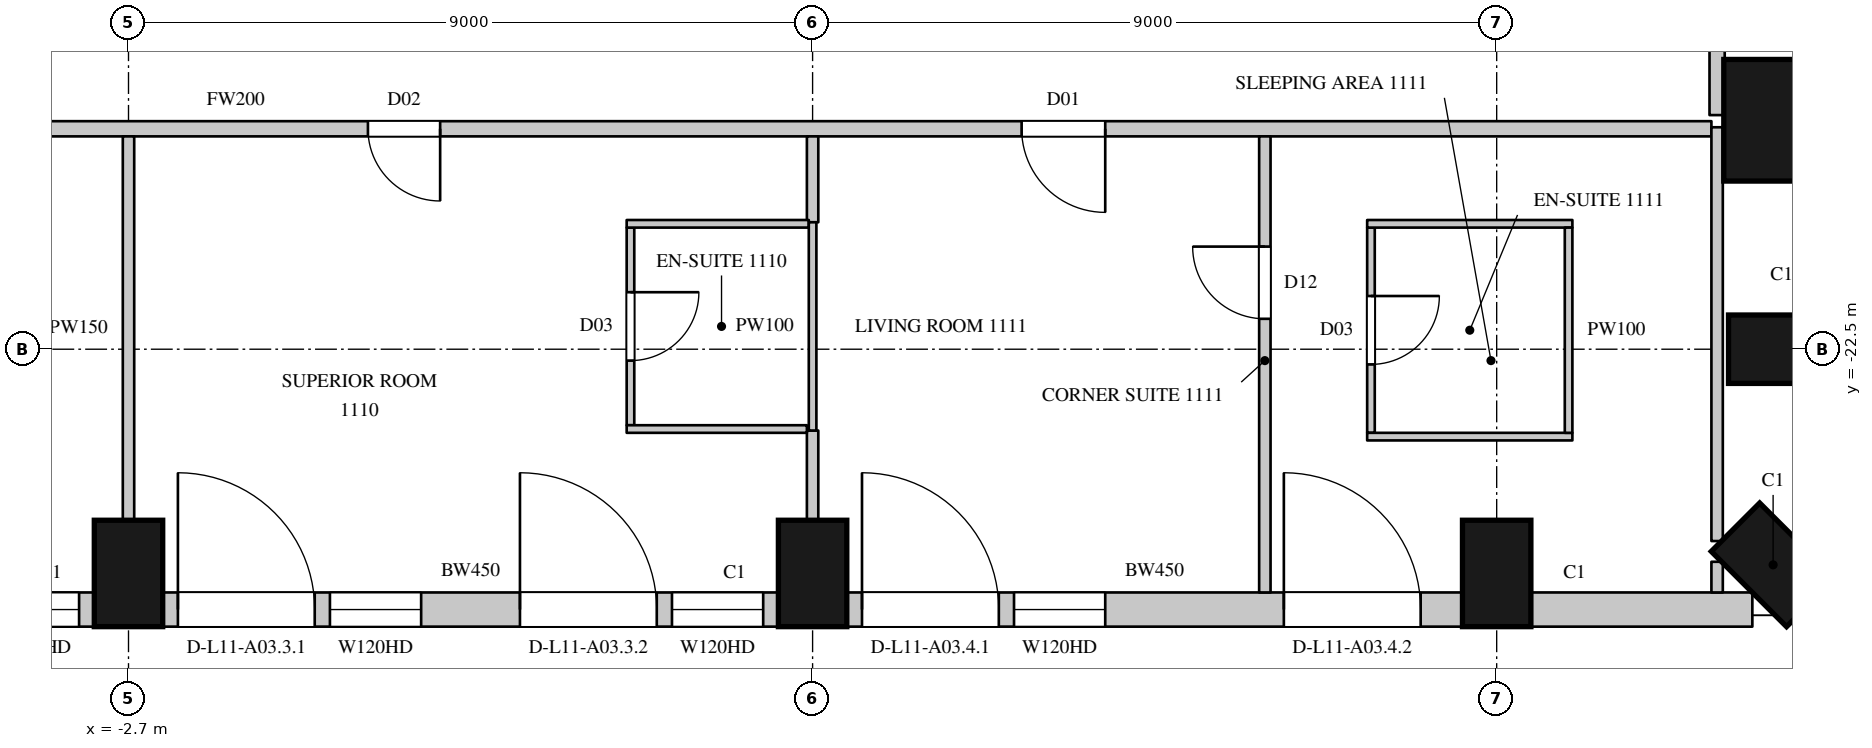
"""IFC4 building model, lengths in metres.
Left out: names, types, materials, properties, quantities, classifications, styles, units other than length and angle.
Written with IfcOpenShell. Run it as: python <this file> out.ifc"""

import sys

from ifc_helpers import new_model, si_unit, direction, frame, frame_2d, origin, origin_2d, place, context, subcontext, project, spatial, rectangle, circle, extrude, element, fill, save


model = new_model("IFC4")
c1 = context("Model", 3, precision=1e-05, world=origin(), true_north=direction((0.0, 1.0)))
c2 = subcontext(c1, "Body", "Model", "MODEL_VIEW")
j1 = project(units=[si_unit("LENGTHUNIT", "METRE"), si_unit("PLANEANGLEUNIT", "RADIAN")], contexts=[c1])
p1 = place(None, origin())
s1 = spatial("IfcSite", under=j1, at=p1, CompositionType="ELEMENT")
p2 = place(p1, origin())
s2 = spatial("IfcBuilding", under=s1, at=p2, CompositionType="ELEMENT")
p3 = place(p2, frame((0.0, 0.0, 69.9)))
s3 = spatial("IfcBuildingStorey", under=s2, at=p3, CompositionType="ELEMENT", Elevation=69.9)
for number, where, z_axis, x_axis in (
    (1, (-2.7, -25.45, 0.0), (0.0, 0.0, 1.0), (1.0, 0.0, 0.0)),
    (2, (6.3, -25.45, 0.0), (0.0, 0.0, 1.0), (1.0, 0.0, 0.0)),
    (3, (15.3, -25.45, 0.0), (0.0, 0.0, 1.0), (1.0, 0.0, 0.0)),
    (4, (18.937, -25.337, 0.0), (0.0, 0.0, 1.0), (0.707, 0.707, 0.0)),
    (5, (19.05, -22.5, 0.0), (0.0, 0.0, 1.0), (0.0, 1.0, 0.0)),
):
    element("IfcColumn", number, at=place(p3, frame(where, z_axis=z_axis, x_axis=x_axis)), inside=s3, PredefinedType="COLUMN", context=c2, shape_type="SweptSolid", body=[
        extrude(rectangle(XDim=0.9, YDim=1.4, at=origin_2d()), origin(), (0.0, 0.0, 1.0), 3.6),
    ])
p4 = place(p3, frame((19.088, -19.488, 0.0), z_axis=(0.0, 0.0, 1.0), x_axis=(1.0, 0.0, 0.0)))
e6 = element("IfcColumn", 6, at=p4, inside=s3, PredefinedType="COLUMN", context=c2, shape_type="SweptSolid", body=[
    extrude(circle(Radius=0.8, at=origin_2d()), origin(), (0.0, 0.0, 1.0), 3.6),
])
p5 = place(p3, frame((-11.25, -25.925, 0.0), z_axis=(0.0, 0.0, 1.0), x_axis=(1.0, 0.0, 0.0)))
e7 = element("IfcWall", 7, at=p5, inside=s3, PredefinedType="SOLIDWALL", context=c2, shape_type="SweptSolid", body=[
    extrude(rectangle(XDim=8.1, YDim=0.45, at=frame_2d((4.05, 0.0))), origin(), (0.0, 0.0, 1.0), 3.3),
])
p6 = place(p5, frame((0.2, 0.0, 0.0)))
e8 = element("IfcOpeningElement", 8, at=p6, cuts=e7, PredefinedType="OPENING", context=c2, shape_type="SweptSolid", body=[
    extrude(rectangle(XDim=1.8, YDim=2.4, at=frame_2d((0.9, 1.2))), frame((0.0, 0.235, 0.0), z_axis=(0.0, -1.0, 0.0), x_axis=(1.0, 0.0, 0.0)), (0.0, 0.0, 1.0), 0.47),
])
p7 = place(p5, frame((2.2, 0.0, 1.05)))
e9 = element("IfcOpeningElement", 9, at=p7, cuts=e7, PredefinedType="OPENING", context=c2, shape_type="SweptSolid", body=[
    extrude(rectangle(XDim=1.2, YDim=2.0, at=frame_2d((0.6, 1.0))), frame((0.0, 0.235, 0.0), z_axis=(0.0, -1.0, 0.0), x_axis=(1.0, 0.0, 0.0)), (0.0, 0.0, 1.0), 0.47),
])
p8 = place(p5, frame((4.7, 0.0, 0.0)))
e10 = element("IfcOpeningElement", 10, at=p8, cuts=e7, PredefinedType="OPENING", context=c2, shape_type="SweptSolid", body=[
    extrude(rectangle(XDim=1.8, YDim=2.4, at=frame_2d((0.9, 1.2))), frame((0.0, 0.235, 0.0), z_axis=(0.0, -1.0, 0.0), x_axis=(1.0, 0.0, 0.0)), (0.0, 0.0, 1.0), 0.47),
])
p9 = place(p5, frame((6.7, 0.0, 1.05)))
e11 = element("IfcOpeningElement", 11, at=p9, cuts=e7, PredefinedType="OPENING", context=c2, shape_type="SweptSolid", body=[
    extrude(rectangle(XDim=1.2, YDim=2.0, at=frame_2d((0.6, 1.0))), frame((0.0, 0.235, 0.0), z_axis=(0.0, -1.0, 0.0), x_axis=(1.0, 0.0, 0.0)), (0.0, 0.0, 1.0), 0.47),
])
p10 = place(p3, frame((-2.25, -25.925, 0.0), z_axis=(0.0, 0.0, 1.0), x_axis=(1.0, 0.0, 0.0)))
e12 = element("IfcWall", 12, at=p10, inside=s3, PredefinedType="SOLIDWALL", context=c2, shape_type="SweptSolid", body=[
    extrude(rectangle(XDim=8.1, YDim=0.45, at=frame_2d((4.05, 0.0))), origin(), (0.0, 0.0, 1.0), 3.3),
])
p11 = place(p10, frame((0.2, 0.0, 0.0)))
e13 = element("IfcOpeningElement", 13, at=p11, cuts=e12, PredefinedType="OPENING", context=c2, shape_type="SweptSolid", body=[
    extrude(rectangle(XDim=1.8, YDim=2.4, at=frame_2d((0.9, 1.2))), frame((0.0, 0.235, 0.0), z_axis=(0.0, -1.0, 0.0), x_axis=(1.0, 0.0, 0.0)), (0.0, 0.0, 1.0), 0.47),
])
p12 = place(p10, frame((2.2, 0.0, 1.05)))
e14 = element("IfcOpeningElement", 14, at=p12, cuts=e12, PredefinedType="OPENING", context=c2, shape_type="SweptSolid", body=[
    extrude(rectangle(XDim=1.2, YDim=2.0, at=frame_2d((0.6, 1.0))), frame((0.0, 0.235, 0.0), z_axis=(0.0, -1.0, 0.0), x_axis=(1.0, 0.0, 0.0)), (0.0, 0.0, 1.0), 0.47),
])
p13 = place(p10, frame((4.7, 0.0, 0.0)))
e15 = element("IfcOpeningElement", 15, at=p13, cuts=e12, PredefinedType="OPENING", context=c2, shape_type="SweptSolid", body=[
    extrude(rectangle(XDim=1.8, YDim=2.4, at=frame_2d((0.9, 1.2))), frame((0.0, 0.235, 0.0), z_axis=(0.0, -1.0, 0.0), x_axis=(1.0, 0.0, 0.0)), (0.0, 0.0, 1.0), 0.47),
])
p14 = place(p10, frame((6.7, 0.0, 1.05)))
e16 = element("IfcOpeningElement", 16, at=p14, cuts=e12, PredefinedType="OPENING", context=c2, shape_type="SweptSolid", body=[
    extrude(rectangle(XDim=1.2, YDim=2.0, at=frame_2d((0.6, 1.0))), frame((0.0, 0.235, 0.0), z_axis=(0.0, -1.0, 0.0), x_axis=(1.0, 0.0, 0.0)), (0.0, 0.0, 1.0), 0.47),
])
p15 = place(p3, frame((6.75, -25.925, 0.0), z_axis=(0.0, 0.0, 1.0), x_axis=(1.0, 0.0, 0.0)))
e17 = element("IfcWall", 17, at=p15, inside=s3, PredefinedType="SOLIDWALL", context=c2, shape_type="SweptSolid", body=[
    extrude(rectangle(XDim=8.1, YDim=0.45, at=frame_2d((4.05, 0.0))), origin(), (0.0, 0.0, 1.0), 3.3),
])
p16 = place(p15, frame((0.2, 0.0, 0.0)))
e18 = element("IfcOpeningElement", 18, at=p16, cuts=e17, PredefinedType="OPENING", context=c2, shape_type="SweptSolid", body=[
    extrude(rectangle(XDim=1.8, YDim=2.4, at=frame_2d((0.9, 1.2))), frame((0.0, 0.235, 0.0), z_axis=(0.0, -1.0, 0.0), x_axis=(1.0, 0.0, 0.0)), (0.0, 0.0, 1.0), 0.47),
])
p17 = place(p15, frame((2.2, 0.0, 1.05)))
e19 = element("IfcOpeningElement", 19, at=p17, cuts=e17, PredefinedType="OPENING", context=c2, shape_type="SweptSolid", body=[
    extrude(rectangle(XDim=1.2, YDim=2.0, at=frame_2d((0.6, 1.0))), frame((0.0, 0.235, 0.0), z_axis=(0.0, -1.0, 0.0), x_axis=(1.0, 0.0, 0.0)), (0.0, 0.0, 1.0), 0.47),
])
p18 = place(p15, frame((5.75, 0.0, 0.0)))
e20 = element("IfcOpeningElement", 20, at=p18, cuts=e17, PredefinedType="OPENING", context=c2, shape_type="SweptSolid", body=[
    extrude(rectangle(XDim=1.8, YDim=2.4, at=frame_2d((0.9, 1.2))), frame((0.0, 0.235, 0.0), z_axis=(0.0, -1.0, 0.0), x_axis=(1.0, 0.0, 0.0)), (0.0, 0.0, 1.0), 0.47),
])
p19 = place(p3, frame((15.75, -25.925, 0.0), z_axis=(0.0, 0.0, 1.0), x_axis=(1.0, 0.0, 0.0)))
e21 = element("IfcWall", 21, at=p19, inside=s3, PredefinedType="SOLIDWALL", context=c2, shape_type="SweptSolid", body=[
    extrude(rectangle(XDim=2.914, YDim=0.45, at=frame_2d((1.457, 0.0))), origin(), (0.0, 0.0, 1.0), 3.3),
])
p20 = place(p3, frame((-20.7, -19.6, 0.0), z_axis=(0.0, 0.0, 1.0), x_axis=(1.0, 0.0, 0.0)))
e22 = element("IfcWall", 22, at=p20, inside=s3, PredefinedType="PARTITIONING", context=c2, shape_type="SweptSolid", body=[
    extrude(rectangle(XDim=38.825, YDim=0.2, at=frame_2d((19.413, 0.0))), origin(), (0.0, 0.0, 1.0), 3.3),
])
p21 = place(p20, frame((3.15, 0.0, 0.0)))
e23 = element("IfcOpeningElement", 23, at=p21, cuts=e22, PredefinedType="OPENING", context=c2, shape_type="SweptSolid", body=[
    extrude(rectangle(XDim=0.95, YDim=2.2, at=frame_2d((0.475, 1.1))), frame((0.0, 0.11, 0.0), z_axis=(0.0, -1.0, 0.0), x_axis=(1.0, 0.0, 0.0)), (0.0, 0.0, 1.0), 0.22),
])
p22 = place(p20, frame((13.9, 0.0, 0.0)))
e24 = element("IfcOpeningElement", 24, at=p22, cuts=e22, PredefinedType="OPENING", context=c2, shape_type="SweptSolid", body=[
    extrude(rectangle(XDim=0.95, YDim=2.2, at=frame_2d((0.475, 1.1))), frame((0.0, 0.11, 0.0), z_axis=(0.0, -1.0, 0.0), x_axis=(1.0, 0.0, 0.0)), (0.0, 0.0, 1.0), 0.22),
])
p23 = place(p20, frame((21.15, 0.0, 0.0)))
e25 = element("IfcOpeningElement", 25, at=p23, cuts=e22, PredefinedType="OPENING", context=c2, shape_type="SweptSolid", body=[
    extrude(rectangle(XDim=0.95, YDim=2.2, at=frame_2d((0.475, 1.1))), frame((0.0, 0.11, 0.0), z_axis=(0.0, -1.0, 0.0), x_axis=(1.0, 0.0, 0.0)), (0.0, 0.0, 1.0), 0.22),
])
p24 = place(p20, frame((29.75, 0.0, 0.0)))
e26 = element("IfcOpeningElement", 26, at=p24, cuts=e22, PredefinedType="OPENING", context=c2, shape_type="SweptSolid", body=[
    extrude(rectangle(XDim=1.1, YDim=2.4, at=frame_2d((0.55, 1.2))), frame((0.0, 0.11, 0.0), z_axis=(0.0, -1.0, 0.0), x_axis=(1.0, 0.0, 0.0)), (0.0, 0.0, 1.0), 0.22),
])
p25 = place(p3, frame((18.2, -19.42, 0.0), z_axis=(0.0, 0.0, 1.0), x_axis=(0.0, 1.0, 0.0)))
e27 = element("IfcWall", 27, at=p25, inside=s3, PredefinedType="PARTITIONING", context=c2, shape_type="SweptSolid", body=[
    extrude(rectangle(XDim=14.67, YDim=0.2, at=frame_2d((7.335, 0.0))), origin(), (0.0, 0.0, 1.0), 3.3),
])
p26 = place(p25, frame((3.95, 0.0, 0.0)))
e28 = element("IfcOpeningElement", 28, at=p26, cuts=e27, PredefinedType="OPENING", context=c2, shape_type="SweptSolid", body=[
    extrude(rectangle(XDim=0.95, YDim=2.2, at=frame_2d((0.475, 1.1))), frame((0.0, 0.11, 0.0), z_axis=(0.0, -1.0, 0.0), x_axis=(1.0, 0.0, 0.0)), (0.0, 0.0, 1.0), 0.22),
])
p27 = place(p25, frame((13.35, 0.0, 0.0)))
e29 = element("IfcOpeningElement", 29, at=p27, cuts=e27, PredefinedType="OPENING", context=c2, shape_type="SweptSolid", body=[
    extrude(rectangle(XDim=0.95, YDim=2.2, at=frame_2d((0.475, 1.1))), frame((0.0, 0.11, 0.0), z_axis=(0.0, -1.0, 0.0), x_axis=(1.0, 0.0, 0.0)), (0.0, 0.0, 1.0), 0.22),
])
p28 = place(p3, frame((-2.7, -24.75, 0.0), z_axis=(0.0, 0.0, 1.0), x_axis=(0.0, 1.0, 0.0)))
e30 = element("IfcWall", 30, at=p28, inside=s3, PredefinedType="PARTITIONING", context=c2, shape_type="SweptSolid", body=[
    extrude(rectangle(XDim=5.05, YDim=0.15, at=frame_2d((2.525, 0.0))), origin(), (0.0, 0.0, 1.0), 2.75),
])
p29 = place(p3, frame((6.3, -24.75, 0.0), z_axis=(0.0, 0.0, 1.0), x_axis=(0.0, 1.0, 0.0)))
e31 = element("IfcWall", 31, at=p29, inside=s3, PredefinedType="PARTITIONING", context=c2, shape_type="SweptSolid", body=[
    extrude(rectangle(XDim=1.18, YDim=0.15, at=frame_2d((0.59, 0.0))), origin(), (0.0, 0.0, 1.0), 2.75),
])
p30 = place(p3, frame((6.3, -20.83, 0.0), z_axis=(0.0, 0.0, 1.0), x_axis=(0.0, 1.0, 0.0)))
e32 = element("IfcWall", 32, at=p30, inside=s3, PredefinedType="PARTITIONING", context=c2, shape_type="SweptSolid", body=[
    extrude(rectangle(XDim=1.13, YDim=0.15, at=frame_2d((0.565, 0.0))), origin(), (0.0, 0.0, 1.0), 2.75),
])
p31 = place(p3, frame((12.25, -25.7, 0.0), z_axis=(0.0, 0.0, 1.0), x_axis=(0.0, 1.0, 0.0)))
e33 = element("IfcWall", 33, at=p31, inside=s3, PredefinedType="PARTITIONING", context=c2, shape_type="SweptSolid", body=[
    extrude(rectangle(XDim=6.0, YDim=0.15, at=frame_2d((3.0, 0.0))), origin(), (0.0, 0.0, 1.0), 3.3),
])
p32 = place(p31, frame((3.6, 0.0, 0.0)))
e34 = element("IfcOpeningElement", 34, at=p32, cuts=e33, PredefinedType="OPENING", context=c2, shape_type="SweptSolid", body=[
    extrude(rectangle(XDim=0.95, YDim=2.2, at=frame_2d((0.475, 1.1))), frame((0.0, 0.085, 0.0), z_axis=(0.0, -1.0, 0.0), x_axis=(1.0, 0.0, 0.0)), (0.0, 0.0, 1.0), 0.17),
])
p33 = place(p3, frame((18.2, -25.7, 0.0), z_axis=(0.0, 0.0, 1.0), x_axis=(0.0, 1.0, 0.0)))
e35 = element("IfcWall", 35, at=p33, inside=s3, PredefinedType="PARTITIONING", context=c2, shape_type="SweptSolid", body=[
    extrude(rectangle(XDim=0.404, YDim=0.15, at=frame_2d((0.202, 0.0))), origin(), (0.0, 0.0, 1.0), 3.3),
])
p34 = place(p3, frame((18.2, -25.024, 0.0), z_axis=(0.0, 0.0, 1.0), x_axis=(0.0, 1.0, 0.0)))
e36 = element("IfcWall", 36, at=p34, inside=s3, PredefinedType="PARTITIONING", context=c2, shape_type="SweptSolid", body=[
    extrude(rectangle(XDim=5.444, YDim=0.15, at=frame_2d((2.722, 0.0))), origin(), (0.0, 0.0, 1.0), 3.3),
])
p35 = place(p3, frame((3.904, -23.5, 0.0), z_axis=(0.0, 0.0, 1.0), x_axis=(0.0, 1.0, 0.0)))
e37 = element("IfcWall", 37, at=p35, inside=s3, PredefinedType="PARTITIONING", context=c2, shape_type="SweptSolid", body=[
    extrude(rectangle(XDim=2.6, YDim=0.1, at=frame_2d((1.3, 0.0))), origin(), (0.0, 0.0, 1.0), 3.3),
])
p36 = place(p35, frame((0.85, 0.0, 0.0)))
e38 = element("IfcOpeningElement", 38, at=p36, cuts=e37, PredefinedType="OPENING", context=c2, shape_type="SweptSolid", body=[
    extrude(rectangle(XDim=0.9, YDim=2.2, at=frame_2d((0.45, 1.1))), frame((0.0, 0.06, 0.0), z_axis=(0.0, -1.0, 0.0), x_axis=(1.0, 0.0, 0.0)), (0.0, 0.0, 1.0), 0.12),
])
p37 = place(p3, frame((3.854, -23.55, 0.0), z_axis=(0.0, 0.0, 1.0), x_axis=(1.0, 0.0, 0.0)))
e39 = element("IfcWall", 39, at=p37, inside=s3, PredefinedType="PARTITIONING", context=c2, shape_type="SweptSolid", body=[
    extrude(rectangle(XDim=2.371, YDim=0.1, at=frame_2d((1.186, 0.0))), origin(), (0.0, 0.0, 1.0), 3.3),
])
p38 = place(p3, frame((3.854, -20.85, 0.0), z_axis=(0.0, 0.0, 1.0), x_axis=(1.0, 0.0, 0.0)))
e40 = element("IfcWall", 40, at=p38, inside=s3, PredefinedType="PARTITIONING", context=c2, shape_type="SweptSolid", body=[
    extrude(rectangle(XDim=2.396, YDim=0.1, at=frame_2d((1.198, 0.0))), origin(), (0.0, 0.0, 1.0), 3.3),
])
p39 = place(p3, frame((6.3, -23.57, 0.0), z_axis=(0.0, 0.0, 1.0), x_axis=(0.0, 1.0, 0.0)))
e41 = element("IfcWall", 41, at=p39, inside=s3, PredefinedType="PARTITIONING", context=c2, shape_type="SweptSolid", body=[
    extrude(rectangle(XDim=2.74, YDim=0.1, at=frame_2d((1.37, 0.0))), origin(), (0.0, 0.0, 1.0), 2.75),
])
p40 = place(p3, frame((13.646, -23.6, 0.0), z_axis=(0.0, 0.0, 1.0), x_axis=(0.0, 1.0, 0.0)))
e42 = element("IfcWall", 42, at=p40, inside=s3, PredefinedType="PARTITIONING", context=c2, shape_type="SweptSolid", body=[
    extrude(rectangle(XDim=2.7, YDim=0.1, at=frame_2d((1.35, 0.0))), origin(), (0.0, 0.0, 1.0), 3.3),
])
p41 = place(p40, frame((0.9, 0.0, 0.0)))
e43 = element("IfcOpeningElement", 43, at=p41, cuts=e42, PredefinedType="OPENING", context=c2, shape_type="SweptSolid", body=[
    extrude(rectangle(XDim=0.9, YDim=2.2, at=frame_2d((0.45, 1.1))), frame((0.0, 0.06, 0.0), z_axis=(0.0, -1.0, 0.0), x_axis=(1.0, 0.0, 0.0)), (0.0, 0.0, 1.0), 0.12),
])
for number, where, z_axis, x_axis in (
    (44, (13.596, -23.65, 0.0), (0.0, 0.0, 1.0), (1.0, 0.0, 0.0)),
    (45, (13.596, -20.85, 0.0), (0.0, 0.0, 1.0), (1.0, 0.0, 0.0)),
):
    element("IfcWall", number, at=place(p3, frame(where, z_axis=z_axis, x_axis=x_axis)), inside=s3, PredefinedType="PARTITIONING", context=c2, shape_type="SweptSolid", body=[
        extrude(rectangle(XDim=2.7, YDim=0.1, at=frame_2d((1.35, 0.0))), origin(), (0.0, 0.0, 1.0), 3.3),
    ])
p42 = place(p3, frame((16.246, -23.6, 0.0), z_axis=(0.0, 0.0, 1.0), x_axis=(0.0, 1.0, 0.0)))
e46 = element("IfcWall", 46, at=p42, inside=s3, PredefinedType="PARTITIONING", context=c2, shape_type="SweptSolid", body=[
    extrude(rectangle(XDim=2.7, YDim=0.1, at=frame_2d((1.35, 0.0))), origin(), (0.0, 0.0, 1.0), 3.3),
])
p43 = place(p9, origin())
e47 = element("IfcWindow", 47, at=p43, inside=s3, PartitioningType="SINGLE_PANEL", PredefinedType="WINDOW", context=c2, shape_type="SweptSolid", body=[
    extrude(rectangle(XDim=1.2, YDim=2.0, at=frame_2d((0.6, 1.0))), frame((0.0, 0.135, 0.0), z_axis=(0.0, -1.0, 0.0), x_axis=(1.0, 0.0, 0.0)), (0.0, 0.0, 1.0), 0.06),
])
fill(e11, e47)
p44 = place(p11, origin())
e48 = element("IfcDoor", 48, at=p44, inside=s3, OperationType="SLIDING_TO_LEFT", PredefinedType="DOOR", context=c2, shape_type="SweptSolid", body=[
    extrude(rectangle(XDim=1.8, YDim=2.4, at=frame_2d((0.9, 1.2))), frame((0.0, 0.13, 0.0), z_axis=(0.0, -1.0, 0.0), x_axis=(1.0, 0.0, 0.0)), (0.0, 0.0, 1.0), 0.05),
])
fill(e13, e48)
p45 = place(p12, origin())
e49 = element("IfcWindow", 49, at=p45, inside=s3, PartitioningType="SINGLE_PANEL", PredefinedType="WINDOW", context=c2, shape_type="SweptSolid", body=[
    extrude(rectangle(XDim=1.2, YDim=2.0, at=frame_2d((0.6, 1.0))), frame((0.0, 0.135, 0.0), z_axis=(0.0, -1.0, 0.0), x_axis=(1.0, 0.0, 0.0)), (0.0, 0.0, 1.0), 0.06),
])
fill(e14, e49)
p46 = place(p13, origin())
e50 = element("IfcDoor", 50, at=p46, inside=s3, OperationType="SLIDING_TO_LEFT", PredefinedType="DOOR", context=c2, shape_type="SweptSolid", body=[
    extrude(rectangle(XDim=1.8, YDim=2.4, at=frame_2d((0.9, 1.2))), frame((0.0, 0.13, 0.0), z_axis=(0.0, -1.0, 0.0), x_axis=(1.0, 0.0, 0.0)), (0.0, 0.0, 1.0), 0.05),
])
fill(e15, e50)
p47 = place(p14, origin())
e51 = element("IfcWindow", 51, at=p47, inside=s3, PartitioningType="SINGLE_PANEL", PredefinedType="WINDOW", context=c2, shape_type="SweptSolid", body=[
    extrude(rectangle(XDim=1.2, YDim=2.0, at=frame_2d((0.6, 1.0))), frame((0.0, 0.135, 0.0), z_axis=(0.0, -1.0, 0.0), x_axis=(1.0, 0.0, 0.0)), (0.0, 0.0, 1.0), 0.06),
])
fill(e16, e51)
p48 = place(p16, origin())
e52 = element("IfcDoor", 52, at=p48, inside=s3, OperationType="SLIDING_TO_LEFT", PredefinedType="DOOR", context=c2, shape_type="SweptSolid", body=[
    extrude(rectangle(XDim=1.8, YDim=2.4, at=frame_2d((0.9, 1.2))), frame((0.0, 0.13, 0.0), z_axis=(0.0, -1.0, 0.0), x_axis=(1.0, 0.0, 0.0)), (0.0, 0.0, 1.0), 0.05),
])
fill(e18, e52)
p49 = place(p17, origin())
e53 = element("IfcWindow", 53, at=p49, inside=s3, PartitioningType="SINGLE_PANEL", PredefinedType="WINDOW", context=c2, shape_type="SweptSolid", body=[
    extrude(rectangle(XDim=1.2, YDim=2.0, at=frame_2d((0.6, 1.0))), frame((0.0, 0.135, 0.0), z_axis=(0.0, -1.0, 0.0), x_axis=(1.0, 0.0, 0.0)), (0.0, 0.0, 1.0), 0.06),
])
fill(e19, e53)
p50 = place(p18, origin())
e54 = element("IfcDoor", 54, at=p50, inside=s3, OperationType="SLIDING_TO_LEFT", PredefinedType="DOOR", context=c2, shape_type="SweptSolid", body=[
    extrude(rectangle(XDim=1.8, YDim=2.4, at=frame_2d((0.9, 1.2))), frame((0.0, 0.13, 0.0), z_axis=(0.0, -1.0, 0.0), x_axis=(1.0, 0.0, 0.0)), (0.0, 0.0, 1.0), 0.05),
])
fill(e20, e54)
p51 = place(p23, origin())
e55 = element("IfcDoor", 55, at=p51, inside=s3, OperationType="SINGLE_SWING_LEFT", PredefinedType="DOOR", context=c2, shape_type="SweptSolid", body=[
    extrude(rectangle(XDim=0.95, YDim=2.2, at=frame_2d((0.475, 1.1))), frame((0.0, 0.025, 0.0), z_axis=(0.0, -1.0, 0.0), x_axis=(1.0, 0.0, 0.0)), (0.0, 0.0, 1.0), 0.05),
])
fill(e25, e55)
p52 = place(p36, origin())
e56 = element("IfcDoor", 56, at=p52, inside=s3, OperationType="SINGLE_SWING_LEFT", PredefinedType="DOOR", context=c2, shape_type="SweptSolid", body=[
    extrude(rectangle(XDim=0.9, YDim=2.2, at=frame_2d((0.45, 1.1))), frame((0.0, 0.025, 0.0), z_axis=(0.0, -1.0, 0.0), x_axis=(1.0, 0.0, 0.0)), (0.0, 0.0, 1.0), 0.05),
])
fill(e38, e56)
p53 = place(p24, origin())
e57 = element("IfcDoor", 57, at=p53, inside=s3, OperationType="SINGLE_SWING_LEFT", PredefinedType="DOOR", context=c2, shape_type="SweptSolid", body=[
    extrude(rectangle(XDim=1.1, YDim=2.4, at=frame_2d((0.55, 1.2))), frame((0.0, 0.025, 0.0), z_axis=(0.0, -1.0, 0.0), x_axis=(1.0, 0.0, 0.0)), (0.0, 0.0, 1.0), 0.05),
])
fill(e26, e57)
p54 = place(p32, origin())
e58 = element("IfcDoor", 58, at=p54, inside=s3, OperationType="SINGLE_SWING_RIGHT", PredefinedType="DOOR", context=c2, shape_type="SweptSolid", body=[
    extrude(rectangle(XDim=0.95, YDim=2.2, at=frame_2d((0.475, 1.1))), frame((0.0, 0.025, 0.0), z_axis=(0.0, -1.0, 0.0), x_axis=(1.0, 0.0, 0.0)), (0.0, 0.0, 1.0), 0.05),
])
fill(e34, e58)
p55 = place(p41, origin())
e59 = element("IfcDoor", 59, at=p55, inside=s3, OperationType="SINGLE_SWING_LEFT", PredefinedType="DOOR", context=c2, shape_type="SweptSolid", body=[
    extrude(rectangle(XDim=0.9, YDim=2.2, at=frame_2d((0.45, 1.1))), frame((0.0, 0.025, 0.0), z_axis=(0.0, -1.0, 0.0), x_axis=(1.0, 0.0, 0.0)), (0.0, 0.0, 1.0), 0.05),
])
fill(e43, e59)
save(model, sys.argv[1])
